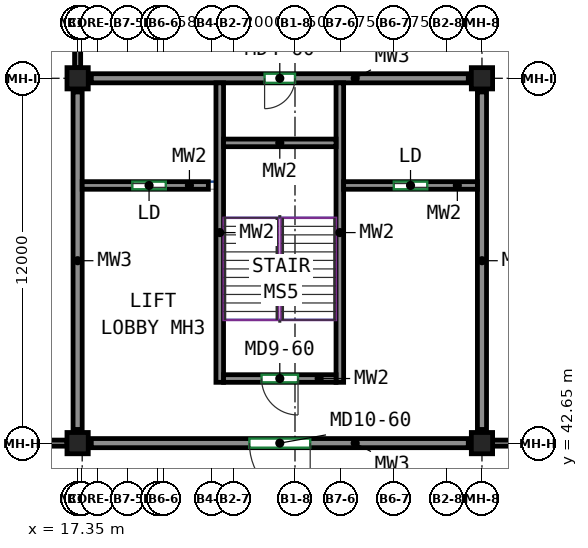
"""IFC4 building model, lengths in metres.
Left out: names, types, materials, properties, quantities, classifications, styles, units other than length and angle.
Written with IfcOpenShell. Run it as: python <this file> out.ifc"""

import sys

from ifc_helpers import new_model, si_unit, direction, frame, frame_2d, origin, origin_2d, place, context, subcontext, project, spatial, rectangle, extrude, source, transform, mapped, element, fill, save


model = new_model("IFC4")
c1 = context("Model", 3, precision=1e-05, world=origin(), true_north=direction((0.0, 1.0)))
c2 = subcontext(c1, "Body", "Model", "MODEL_VIEW")
j1 = project(units=[si_unit("LENGTHUNIT", "METRE"), si_unit("PLANEANGLEUNIT", "RADIAN")], contexts=[c1])
p1 = place(None, origin())
s1 = spatial("IfcSite", under=j1, at=p1, CompositionType="ELEMENT")
p2 = place(p1, origin())
s2 = spatial("IfcBuilding", under=s1, at=p2, CompositionType="ELEMENT")
p3 = place(p2, frame((0.0, 0.0, 18.0)))
s3 = spatial("IfcBuildingStorey", under=s2, at=p3, CompositionType="ELEMENT", Elevation=18.0)
m1 = source(origin(), c2, "Body", "SweptSolid", [
    extrude(rectangle(XDim=0.7, YDim=0.7, at=origin_2d()), origin(), (0.0, 0.0, 1.0), 4.1),
])
for number, where, z_axis, x_axis in (
    (1, (17.35, 42.65, 0.0), (0.0, 0.0, 1.0), (1.0, 0.0, 0.0)),
    (2, (17.35, 54.65, 0.0), (0.0, 0.0, 1.0), (1.0, 0.0, 0.0)),
    (3, (30.65, 42.65, 0.0), (0.0, 0.0, 1.0), (1.0, 0.0, 0.0)),
    (4, (30.65, 54.65, 0.0), (0.0, 0.0, 1.0), (1.0, 0.0, 0.0)),
):
    element("IfcColumn", number, at=place(p3, frame(where, z_axis=z_axis, x_axis=x_axis)), inside=s3, PredefinedType="COLUMN", context=c2, shape_type="MappedRepresentation", body=[
        mapped(m1, transform((0.0, 0.0, 0.0))),
    ])
m2 = source(origin(), c2, "Body", "SweptSolid", [
    extrude(rectangle(XDim=12.4, YDim=0.3, at=frame_2d((6.2, 0.0))), origin(), (0.0, 0.0, 1.0), 3.3),
])
p4 = place(p3, frame((30.2, 54.65, 0.0), z_axis=(0.0, 0.0, 1.0), x_axis=(-1.0, 0.0, 0.0)))
e5 = element("IfcWall", 5, at=p4, inside=s3, PredefinedType="SHEAR", context=c2, shape_type="MappedRepresentation", body=[
    mapped(m2, transform((0.0, 0.0, 0.0))),
])
p5 = place(p4, frame((5.7, 0.0, 0.0)))
e6 = element("IfcOpeningElement", 6, at=p5, cuts=e5, PredefinedType="OPENING", context=c2, shape_type="SweptSolid", body=[
    extrude(rectangle(XDim=1.0, YDim=2.1, at=frame_2d((0.5, 1.05))), frame((0.0, 0.16, 0.0), z_axis=(0.0, -1.0, 0.0), x_axis=(1.0, 0.0, 0.0)), (0.0, 0.0, 1.0), 0.32),
])
p6 = place(p3, frame((30.2, 42.65, 0.0), z_axis=(0.0, 0.0, 1.0), x_axis=(-1.0, 0.0, 0.0)))
e7 = element("IfcWall", 7, at=p6, inside=s3, PredefinedType="SHEAR", context=c2, shape_type="MappedRepresentation", body=[
    mapped(m2, transform((0.0, 0.0, 0.0))),
])
p7 = place(p6, frame((5.2, 0.0, 0.0)))
e8 = element("IfcOpeningElement", 8, at=p7, cuts=e7, PredefinedType="OPENING", context=c2, shape_type="SweptSolid", body=[
    extrude(rectangle(XDim=2.0, YDim=2.4, at=frame_2d((1.0, 1.2))), frame((0.0, 0.16, 0.0), z_axis=(0.0, -1.0, 0.0), x_axis=(1.0, 0.0, 0.0)), (0.0, 0.0, 1.0), 0.32),
])
m3 = source(origin(), c2, "Body", "SweptSolid", [
    extrude(rectangle(XDim=11.1, YDim=0.3, at=frame_2d((5.55, 0.0))), origin(), (0.0, 0.0, 1.0), 3.3),
])
for number, where, z_axis, x_axis in (
    (9, (30.65, 54.2, 0.0), (0.0, 0.0, 1.0), (0.0, -1.0, 0.0)),
    (10, (17.35, 54.2, 0.0), (0.0, 0.0, 1.0), (0.0, -1.0, 0.0)),
):
    element("IfcWall", number, at=place(p3, frame(where, z_axis=z_axis, x_axis=x_axis)), inside=s3, PredefinedType="SHEAR", context=c2, shape_type="MappedRepresentation", body=[
        mapped(m3, transform((0.0, 0.0, 0.0))),
    ])
m4 = source(origin(), c2, "Body", "SweptSolid", [
    extrude(rectangle(XDim=9.85, YDim=0.25, at=frame_2d((4.925, 0.0))), origin(), (0.0, 0.0, 1.0), 4.1),
])
for number, where, z_axis, x_axis in (
    (11, (25.975, 54.5, 0.0), (0.0, 0.0, 1.0), (0.0, -1.0, 0.0)),
    (12, (22.025, 54.5, 0.0), (0.0, 0.0, 1.0), (0.0, -1.0, 0.0)),
):
    element("IfcWall", number, at=place(p3, frame(where, z_axis=z_axis, x_axis=x_axis)), inside=s3, PredefinedType="SHEAR", context=c2, shape_type="MappedRepresentation", body=[
        mapped(m4, transform((0.0, 0.0, 0.0))),
    ])
m5 = source(origin(), c2, "Body", "SweptSolid", [
    extrude(rectangle(XDim=3.7, YDim=0.25, at=frame_2d((1.85, 0.0))), origin(), (0.0, 0.0, 1.0), 4.1),
])
p8 = place(p3, frame((25.85, 52.525, 0.0), z_axis=(0.0, 0.0, 1.0), x_axis=(-1.0, 0.0, 0.0)))
e13 = element("IfcWall", 13, at=p8, inside=s3, PredefinedType="SHEAR", context=c2, shape_type="MappedRepresentation", body=[
    mapped(m5, transform((0.0, 0.0, 0.0))),
])
p9 = place(p3, frame((25.85, 44.775, 0.0), z_axis=(0.0, 0.0, 1.0), x_axis=(-1.0, 0.0, 0.0)))
e14 = element("IfcWall", 14, at=p9, inside=s3, PredefinedType="SHEAR", context=c2, shape_type="MappedRepresentation", body=[
    mapped(m5, transform((0.0, 0.0, 0.0))),
])
p10 = place(p9, frame((1.25, 0.0, 0.0)))
e15 = element("IfcOpeningElement", 15, at=p10, cuts=e14, PredefinedType="OPENING", context=c2, shape_type="SweptSolid", body=[
    extrude(rectangle(XDim=1.2, YDim=2.1, at=frame_2d((0.6, 1.05))), frame((0.0, 0.135, 0.0), z_axis=(0.0, -1.0, 0.0), x_axis=(1.0, 0.0, 0.0)), (0.0, 0.0, 1.0), 0.27),
])
m6 = source(origin(), c2, "Body", "SweptSolid", [
    extrude(rectangle(XDim=4.4, YDim=0.25, at=frame_2d((2.2, 0.0))), origin(), (0.0, 0.0, 1.0), 4.1),
])
p11 = place(p3, frame((30.5, 51.125, 0.0), z_axis=(0.0, 0.0, 1.0), x_axis=(-1.0, 0.0, 0.0)))
e16 = element("IfcWall", 16, at=p11, inside=s3, PredefinedType="SHEAR", context=c2, shape_type="MappedRepresentation", body=[
    mapped(m6, transform((0.0, 0.0, 0.0))),
])
p12 = place(p11, frame((1.65, 0.0, 0.0)))
e17 = element("IfcOpeningElement", 17, at=p12, cuts=e16, PredefinedType="OPENING", context=c2, shape_type="SweptSolid", body=[
    extrude(rectangle(XDim=1.1, YDim=2.1, at=frame_2d((0.55, 1.05))), frame((0.0, 0.135, 0.0), z_axis=(0.0, -1.0, 0.0), x_axis=(1.0, 0.0, 0.0)), (0.0, 0.0, 1.0), 0.27),
])
m7 = source(origin(), c2, "Body", "SweptSolid", [
    extrude(rectangle(XDim=4.15, YDim=0.25, at=frame_2d((2.075, 0.0))), origin(), (0.0, 0.0, 1.0), 4.1),
])
p13 = place(p3, frame((21.65, 51.125, 0.0), z_axis=(0.0, 0.0, 1.0), x_axis=(-1.0, 0.0, 0.0)))
e18 = element("IfcWall", 18, at=p13, inside=s3, PredefinedType="SHEAR", context=c2, shape_type="MappedRepresentation", body=[
    mapped(m7, transform((0.0, 0.0, 0.0))),
])
p14 = place(p13, frame((1.4, 0.0, 0.0)))
e19 = element("IfcOpeningElement", 19, at=p14, cuts=e18, PredefinedType="OPENING", context=c2, shape_type="SweptSolid", body=[
    extrude(rectangle(XDim=1.1, YDim=2.1, at=frame_2d((0.55, 1.05))), frame((0.0, 0.135, 0.0), z_axis=(0.0, -1.0, 0.0), x_axis=(1.0, 0.0, 0.0)), (0.0, 0.0, 1.0), 0.27),
])
m8 = source(origin(), c2, "Body", "SweptSolid", [
    extrude(rectangle(XDim=11.3, YDim=0.2, at=frame_2d((5.65, 0.0))), origin(), (0.0, 0.0, 1.0), 3.3),
])
p15 = place(p3, frame((5.7, 42.65, 0.0), z_axis=(0.0, 0.0, 1.0), x_axis=(1.0, 0.0, 0.0)))
e20 = element("IfcWall", 20, at=p15, inside=s3, PredefinedType="PARTITIONING", context=c2, shape_type="MappedRepresentation", body=[
    mapped(m8, transform((0.0, 0.0, 0.0))),
])
m9 = source(origin(), c2, "Body", "SweptSolid", [
    extrude(rectangle(XDim=1.85, YDim=0.2, at=frame_2d((0.925, 0.0))), origin(), (0.0, 0.0, 1.0), 4.1),
])
p16 = place(p3, frame((17.35, 56.85, 0.0), z_axis=(0.0, 0.0, 1.0), x_axis=(0.0, -1.0, 0.0)))
e21 = element("IfcWall", 21, at=p16, inside=s3, PredefinedType="PARTITIONING", context=c2, shape_type="MappedRepresentation", body=[
    mapped(m9, transform((0.0, 0.0, 0.0))),
])
p17 = place(p3, frame((31.0, 42.65, 0.0), z_axis=(0.0, 0.0, 1.0), x_axis=(1.0, 0.0, 0.0)))
e22 = element("IfcWall", 22, at=p17, inside=s3, PredefinedType="PARTITIONING", context=c2, shape_type="MappedRepresentation", body=[
    mapped(m8, transform((0.0, 0.0, 0.0))),
])
p18 = place(p17, frame((5.05, 0.0, 0.0)))
e23 = element("IfcOpeningElement", 23, at=p18, cuts=e22, PredefinedType="OPENING", context=c2, shape_type="SweptSolid", body=[
    extrude(rectangle(XDim=1.2, YDim=2.1, at=frame_2d((0.6, 1.05))), frame((0.0, 0.11, 0.0), z_axis=(0.0, -1.0, 0.0), x_axis=(1.0, 0.0, 0.0)), (0.0, 0.0, 1.0), 0.22),
])
p19 = place(p10, origin())
e24 = element("IfcDoor", 24, at=p19, inside=s3, OperationType="DOUBLE_DOOR_SINGLE_SWING", PredefinedType="DOOR", context=c2, shape_type="SweptSolid", body=[
    extrude(rectangle(XDim=1.2, YDim=2.1, at=frame_2d((0.6, 1.05))), frame((0.0, 0.025, 0.0), z_axis=(0.0, -1.0, 0.0), x_axis=(1.0, 0.0, 0.0)), (0.0, 0.0, 1.0), 0.05),
])
fill(e15, e24)
p20 = place(p7, origin())
e25 = element("IfcDoor", 25, at=p20, inside=s3, OperationType="DOUBLE_DOOR_SINGLE_SWING", PredefinedType="DOOR", context=c2, shape_type="SweptSolid", body=[
    extrude(rectangle(XDim=2.0, YDim=2.4, at=frame_2d((1.0, 1.2))), frame((0.0, 0.025, 0.0), z_axis=(0.0, -1.0, 0.0), x_axis=(1.0, 0.0, 0.0)), (0.0, 0.0, 1.0), 0.05),
])
fill(e8, e25)
p21 = place(p12, origin())
e26 = element("IfcDoor", 26, at=p21, inside=s3, OperationType="SLIDING_TO_LEFT", PredefinedType="DOOR", context=c2, shape_type="SweptSolid", body=[
    extrude(rectangle(XDim=1.1, YDim=2.1, at=frame_2d((0.55, 1.05))), frame((0.0, 0.025, 0.0), z_axis=(0.0, -1.0, 0.0), x_axis=(1.0, 0.0, 0.0)), (0.0, 0.0, 1.0), 0.05),
])
fill(e17, e26)
p22 = place(p14, origin())
e27 = element("IfcDoor", 27, at=p22, inside=s3, OperationType="SLIDING_TO_LEFT", PredefinedType="DOOR", context=c2, shape_type="SweptSolid", body=[
    extrude(rectangle(XDim=1.1, YDim=2.1, at=frame_2d((0.55, 1.05))), frame((0.0, 0.025, 0.0), z_axis=(0.0, -1.0, 0.0), x_axis=(1.0, 0.0, 0.0)), (0.0, 0.0, 1.0), 0.05),
])
fill(e19, e27)
p23 = place(p5, origin())
e28 = element("IfcDoor", 28, at=p23, inside=s3, OperationType="SINGLE_SWING_RIGHT", PredefinedType="DOOR", context=c2, shape_type="SweptSolid", body=[
    extrude(rectangle(XDim=1.0, YDim=2.1, at=frame_2d((0.5, 1.05))), frame((0.0, 0.025, 0.0), z_axis=(0.0, -1.0, 0.0), x_axis=(1.0, 0.0, 0.0)), (0.0, 0.0, 1.0), 0.05),
])
fill(e6, e28)
save(model, sys.argv[1])
